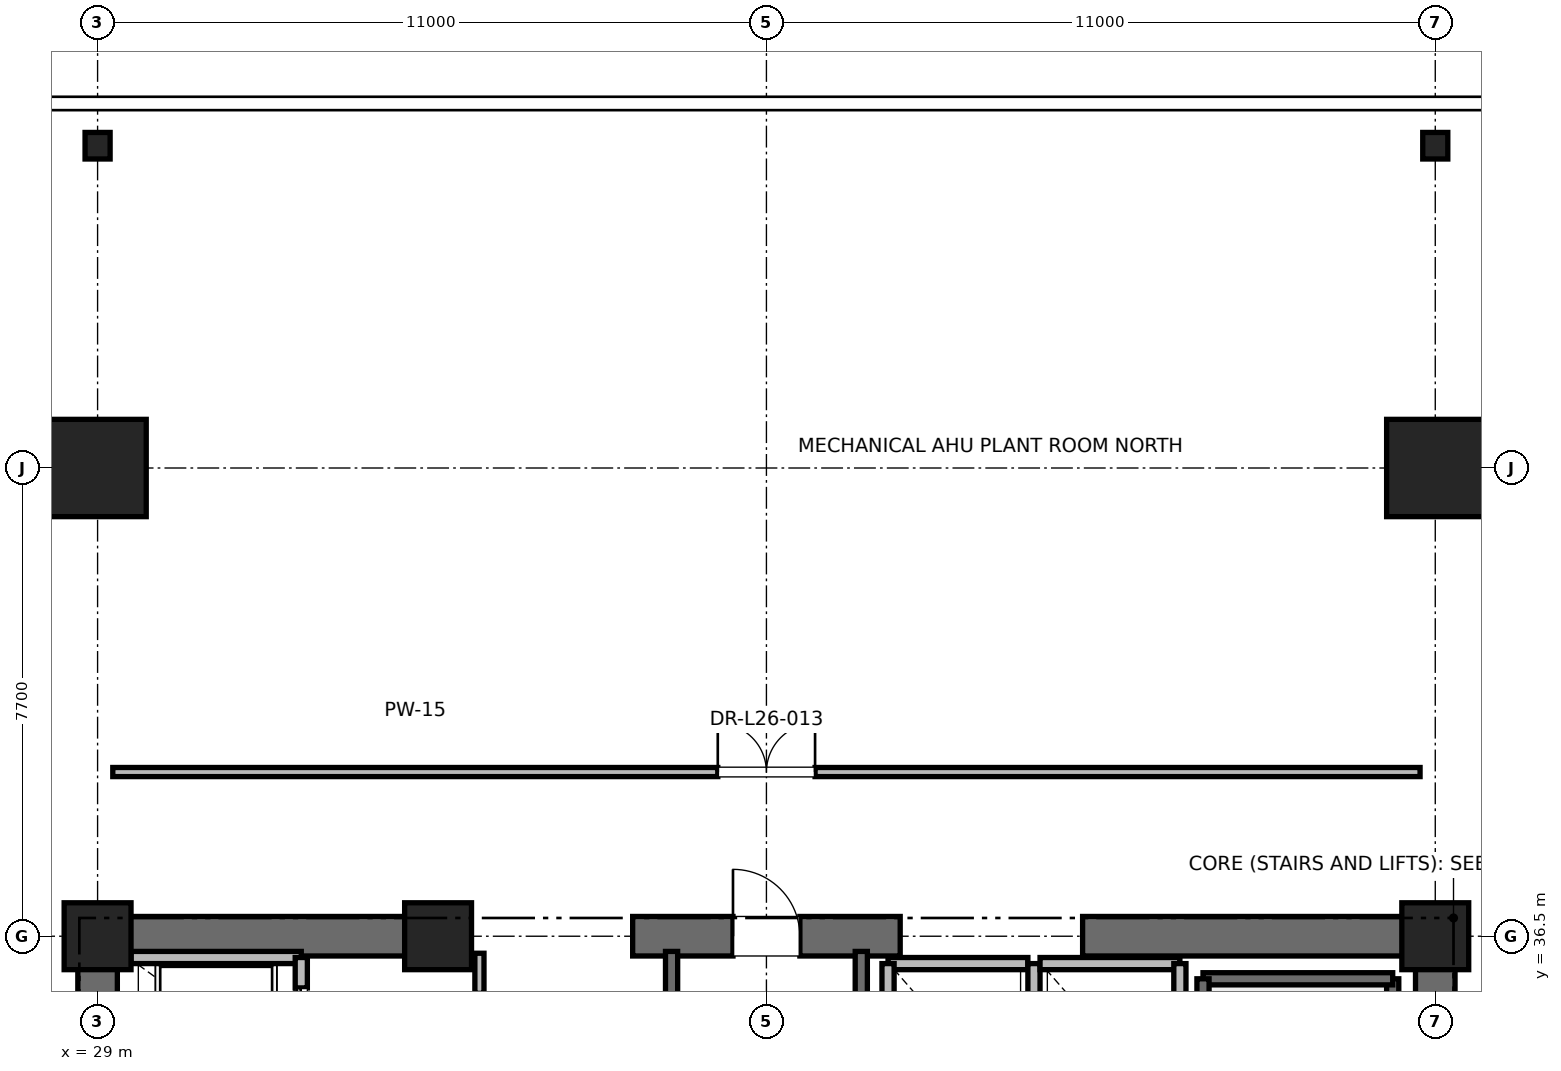
"""IFC4 building model, lengths in metres.
Left out: names, types, materials, properties, quantities, classifications, styles, units other than length and angle.
Written with IfcOpenShell. Run it as: python <this file> out.ifc"""

import sys

from ifc_helpers import new_model, si_unit, direction, frame, frame_2d, origin, origin_2d, place, context, subcontext, project, spatial, rectangle, i_section, extrude, element, fill, save


model = new_model("IFC4")
c1 = context("Model", 3, precision=1e-05, world=origin(), true_north=direction((0.0, 1.0)))
c2 = subcontext(c1, "Body", "Model", "MODEL_VIEW")
j1 = project(units=[si_unit("LENGTHUNIT", "METRE"), si_unit("PLANEANGLEUNIT", "RADIAN")], contexts=[c1])
p1 = place(None, origin())
s1 = spatial("IfcSite", under=j1, at=p1, CompositionType="ELEMENT")
p2 = place(p1, origin())
s2 = spatial("IfcBuilding", under=s1, at=p2, CompositionType="ELEMENT")
p3 = place(p2, frame((0.0, 0.0, 113.0)))
s3 = spatial("IfcBuildingStorey", under=s2, at=p3, CompositionType="ELEMENT", Elevation=113.0)
for number, where, z_axis, x_axis in (
    (1, (29.0, 44.2, 0.0), (0.0, 0.0, 1.0), (1.0, 0.0, 0.0)),
    (2, (51.0, 44.2, 0.0), (0.0, 0.0, 1.0), (1.0, 0.0, 0.0)),
):
    element("IfcColumn", number, at=place(p3, frame(where, z_axis=z_axis, x_axis=x_axis)), inside=s3, PredefinedType="COLUMN", context=c2, shape_type="SweptSolid", body=[
        extrude(rectangle(XDim=1.6, YDim=1.6, at=origin_2d()), origin(), (0.0, 0.0, 1.0), 5.4),
    ])
for number, where, z_axis, x_axis in (
    (3, (29.0, 49.5, 0.0), (0.0, 0.0, 1.0), (1.0, 0.0, 0.0)),
    (4, (51.0, 49.5, 0.0), (0.0, 0.0, 1.0), (1.0, 0.0, 0.0)),
):
    element("IfcColumn", number, at=place(p3, frame(where, z_axis=z_axis, x_axis=x_axis)), inside=s3, PredefinedType="COLUMN", context=c2, shape_type="SweptSolid", body=[
        extrude(i_section(OverallWidth=0.412, OverallDepth=0.437, WebThickness=0.036, FlangeThickness=0.058, FilletRadius=0.015, at=origin_2d()), origin(), (0.0, 0.0, 1.0), 5.4),
    ])
for number, where, z_axis, x_axis in (
    (5, (29.0, 36.5, 0.0), (0.0, 0.0, 1.0), (1.0, 0.0, 0.0)),
    (6, (51.0, 36.5, 0.0), (0.0, 0.0, 1.0), (1.0, 0.0, 0.0)),
    (7, (34.6, 36.5, 0.0), (0.0, 0.0, 1.0), (1.0, 0.0, 0.0)),
):
    element("IfcColumn", number, at=place(p3, frame(where, z_axis=z_axis, x_axis=x_axis)), inside=s3, PredefinedType="PILASTER", context=c2, shape_type="SweptSolid", body=[
        extrude(rectangle(XDim=1.1, YDim=1.1, at=origin_2d()), origin(), (0.0, 0.0, 1.0), 5.4),
    ])
p4 = place(p3, frame((29.0, 36.5, 0.0), z_axis=(0.0, 0.0, 1.0), x_axis=(1.0, 0.0, 0.0)))
e8 = element("IfcWall", 8, at=p4, inside=s3, PredefinedType="SHEAR", context=c2, shape_type="SweptSolid", body=[
    extrude(rectangle(XDim=5.8, YDim=0.65, at=frame_2d((2.9, 0.0))), origin(), (0.0, 0.0, 1.0), 5.1),
])
p5 = place(p3, frame((37.8, 36.5, 0.0), z_axis=(0.0, 0.0, 1.0), x_axis=(1.0, 0.0, 0.0)))
e9 = element("IfcWall", 9, at=p5, inside=s3, PredefinedType="SHEAR", context=c2, shape_type="SweptSolid", body=[
    extrude(rectangle(XDim=4.4, YDim=0.65, at=frame_2d((2.2, 0.0))), origin(), (0.0, 0.0, 1.0), 5.1),
])
p6 = place(p5, frame((1.65, 0.0, 0.0)))
e10 = element("IfcOpeningElement", 10, at=p6, cuts=e9, PredefinedType="OPENING", context=c2, shape_type="SweptSolid", body=[
    extrude(rectangle(XDim=1.1, YDim=2.15, at=frame_2d((0.55, 1.075))), frame((0.0, 0.325, 0.0), z_axis=(0.0, -1.0, 0.0), x_axis=(1.0, 0.0, 0.0)), (0.0, 0.0, 1.0), 0.65),
])
for number, where, z_axis, x_axis in (
    (11, (45.2, 36.5, 0.0), (0.0, 0.0, 1.0), (1.0, 0.0, 0.0)),
    (12, (29.0, 30.7, 0.0), (0.0, 0.0, 1.0), (0.0, 1.0, 0.0)),
):
    element("IfcWall", number, at=place(p3, frame(where, z_axis=z_axis, x_axis=x_axis)), inside=s3, PredefinedType="SHEAR", context=c2, shape_type="SweptSolid", body=[
        extrude(rectangle(XDim=5.8, YDim=0.65, at=frame_2d((2.9, 0.0))), origin(), (0.0, 0.0, 1.0), 5.1),
    ])
p7 = place(p3, frame((51.0, 27.7, 0.0), z_axis=(0.0, 0.0, 1.0), x_axis=(0.0, 1.0, 0.0)))
e13 = element("IfcWall", 13, at=p7, inside=s3, PredefinedType="SHEAR", context=c2, shape_type="SweptSolid", body=[
    extrude(rectangle(XDim=8.8, YDim=0.65, at=frame_2d((4.4, 0.0))), origin(), (0.0, 0.0, 1.0), 5.1),
])
p8 = place(p3, frame((50.3, 27.65, 0.0), z_axis=(0.0, 0.0, 1.0), x_axis=(0.0, 1.0, 0.0)))
e14 = element("IfcWall", 14, at=p8, inside=s3, PredefinedType="SOLIDWALL", context=c2, shape_type="SweptSolid", body=[
    extrude(rectangle(XDim=8.15, YDim=0.2, at=frame_2d((4.075, 0.0))), origin(), (0.0, 0.0, 1.0), 5.1),
])
p9 = place(p3, frame((47.18, 35.8, 0.0), z_axis=(0.0, 0.0, 1.0), x_axis=(1.0, 0.0, 0.0)))
e15 = element("IfcWall", 15, at=p9, inside=s3, PredefinedType="SOLIDWALL", context=c2, shape_type="SweptSolid", body=[
    extrude(rectangle(XDim=3.12, YDim=0.2, at=frame_2d((1.56, 0.0))), origin(), (0.0, 0.0, 1.0), 5.1),
])
p10 = place(p3, frame((47.18, 27.62, 0.0), z_axis=(0.0, 0.0, 1.0), x_axis=(0.0, 1.0, 0.0)))
e16 = element("IfcWall", 16, at=p10, inside=s3, PredefinedType="SOLIDWALL", context=c2, shape_type="SweptSolid", body=[
    extrude(rectangle(XDim=8.18, YDim=0.2, at=frame_2d((4.09, 0.0))), origin(), (0.0, 0.0, 1.0), 5.1),
])
p11 = place(p3, frame((38.44, 27.38, 0.0), z_axis=(0.0, 0.0, 1.0), x_axis=(0.0, 1.0, 0.0)))
e17 = element("IfcWall", 17, at=p11, inside=s3, PredefinedType="SOLIDWALL", context=c2, shape_type="SweptSolid", body=[
    extrude(rectangle(XDim=8.87, YDim=0.2, at=frame_2d((4.435, 0.0))), origin(), (0.0, 0.0, 1.0), 5.1),
])
p12 = place(p3, frame((41.56, 27.68, 0.0), z_axis=(0.0, 0.0, 1.0), x_axis=(0.0, 1.0, 0.0)))
e18 = element("IfcWall", 18, at=p12, inside=s3, PredefinedType="SOLIDWALL", context=c2, shape_type="SweptSolid", body=[
    extrude(rectangle(XDim=8.57, YDim=0.2, at=frame_2d((4.285, 0.0))), origin(), (0.0, 0.0, 1.0), 5.1),
])
p13 = place(p3, frame((32.35, 36.15, 0.0), z_axis=(0.0, 0.0, 1.0), x_axis=(-1.0, 0.0, 0.0)))
e19 = element("IfcWall", 19, at=p13, inside=s3, PredefinedType="SOLIDWALL", context=c2, shape_type="SweptSolid", body=[
    extrude(rectangle(XDim=2.8, YDim=0.2, at=frame_2d((1.4, 0.0))), origin(), (0.0, 0.0, 1.0), 4.153),
])
p14 = place(p3, frame((32.35, 34.05, 0.0), z_axis=(0.0, 0.0, 1.0), x_axis=(0.0, 1.0, 0.0)))
e20 = element("IfcWall", 20, at=p14, inside=s3, PredefinedType="SOLIDWALL", context=c2, shape_type="SweptSolid", body=[
    extrude(rectangle(XDim=2.1, YDim=0.2, at=frame_2d((1.05, 0.0))), origin(), (0.0, 0.0, 1.0), 5.1),
])
p15 = place(p14, frame((0.5, 0.0, 0.0)))
e21 = element("IfcOpeningElement", 21, at=p15, cuts=e20, PredefinedType="OPENING", context=c2, shape_type="SweptSolid", body=[
    extrude(rectangle(XDim=1.1, YDim=2.2, at=frame_2d((0.55, 1.1))), frame((0.0, 0.1, 0.0), z_axis=(0.0, -1.0, 0.0), x_axis=(1.0, 0.0, 0.0)), (0.0, 0.0, 1.0), 0.2),
])
p16 = place(p3, frame((44.3, 36.05, 0.0), z_axis=(0.0, 0.0, 1.0), x_axis=(-1.0, 0.0, 0.0)))
e22 = element("IfcWall", 22, at=p16, inside=s3, PredefinedType="SOLIDWALL", context=c2, shape_type="SweptSolid", body=[
    extrude(rectangle(XDim=2.3, YDim=0.2, at=frame_2d((1.15, 0.0))), origin(), (0.0, 0.0, 1.0), 3.88),
])
for number, where, z_axis, x_axis in (
    (23, (42.0, 36.05, 0.0), (0.0, 0.0, 1.0), (0.0, -1.0, 0.0)),
    (24, (44.4, 33.45, 0.0), (0.0, 0.0, 1.0), (0.0, 1.0, 0.0)),
):
    element("IfcWall", number, at=place(p3, frame(where, z_axis=z_axis, x_axis=x_axis)), inside=s3, PredefinedType="SOLIDWALL", context=c2, shape_type="SweptSolid", body=[
        extrude(rectangle(XDim=2.6, YDim=0.2, at=frame_2d((1.3, 0.0))), origin(), (0.0, 0.0, 1.0), 3.88),
    ])
p17 = place(p3, frame((46.8, 36.05, 0.0), z_axis=(0.0, 0.0, 1.0), x_axis=(-1.0, 0.0, 0.0)))
e25 = element("IfcWall", 25, at=p17, inside=s3, PredefinedType="SOLIDWALL", context=c2, shape_type="SweptSolid", body=[
    extrude(rectangle(XDim=2.3, YDim=0.2, at=frame_2d((1.15, 0.0))), origin(), (0.0, 0.0, 1.0), 3.88),
])
p18 = place(p3, frame((46.8, 33.45, 0.0), z_axis=(0.0, 0.0, 1.0), x_axis=(0.0, 1.0, 0.0)))
e26 = element("IfcWall", 26, at=p18, inside=s3, PredefinedType="SOLIDWALL", context=c2, shape_type="SweptSolid", body=[
    extrude(rectangle(XDim=2.6, YDim=0.2, at=frame_2d((1.3, 0.0))), origin(), (0.0, 0.0, 1.0), 5.1),
])
p19 = place(p3, frame((35.28, 33.95, 0.0), z_axis=(0.0, 0.0, 1.0), x_axis=(0.0, 1.0, 0.0)))
e27 = element("IfcWall", 27, at=p19, inside=s3, PredefinedType="PARTITIONING", context=c2, shape_type="SweptSolid", body=[
    extrude(rectangle(XDim=2.27, YDim=0.15, at=frame_2d((1.135, 0.0))), origin(), (0.0, 0.0, 1.0), 2.85),
])
p20 = place(p19, frame((0.66, 0.0, 0.0)))
e28 = element("IfcOpeningElement", 28, at=p20, cuts=e27, PredefinedType="OPENING", context=c2, shape_type="SweptSolid", body=[
    extrude(rectangle(XDim=0.95, YDim=2.15, at=frame_2d((0.475, 1.075))), frame((0.0, 0.075, 0.0), z_axis=(0.0, -1.0, 0.0), x_axis=(1.0, 0.0, 0.0)), (0.0, 0.0, 1.0), 0.15),
])
p21 = place(p3, frame((29.25, 39.2, 0.0), z_axis=(0.0, 0.0, 1.0), x_axis=(1.0, 0.0, 0.0)))
e29 = element("IfcWall", 29, at=p21, inside=s3, PredefinedType="PARTITIONING", context=c2, shape_type="SweptSolid", body=[
    extrude(rectangle(XDim=21.5, YDim=0.15, at=frame_2d((10.75, 0.0))), origin(), (0.0, 0.0, 1.0), 2.85),
])
p22 = place(p21, frame((9.95, 0.0, 0.0)))
e30 = element("IfcOpeningElement", 30, at=p22, cuts=e29, PredefinedType="OPENING", context=c2, shape_type="SweptSolid", body=[
    extrude(rectangle(XDim=1.6, YDim=2.25, at=frame_2d((0.8, 1.125))), frame((0.0, 0.075, 0.0), z_axis=(0.0, -1.0, 0.0), x_axis=(1.0, 0.0, 0.0)), (0.0, 0.0, 1.0), 0.15),
])
p23 = place(p6, origin())
e31 = element("IfcDoor", 31, at=p23, inside=s3, OperationType="SINGLE_SWING_LEFT", PredefinedType="DOOR", context=c2, shape_type="SweptSolid", body=[
    extrude(rectangle(XDim=1.1, YDim=2.15, at=frame_2d((0.55, 1.075))), frame((0.0, 0.025, 0.0), z_axis=(0.0, -1.0, 0.0), x_axis=(1.0, 0.0, 0.0)), (0.0, 0.0, 1.0), 0.05),
])
fill(e10, e31)
p24 = place(p15, origin())
e32 = element("IfcDoor", 32, at=p24, inside=s3, OperationType="SLIDING_TO_RIGHT", PredefinedType="DOOR", context=c2, shape_type="SweptSolid", body=[
    extrude(rectangle(XDim=1.1, YDim=2.2, at=frame_2d((0.55, 1.1))), frame((0.0, 0.025, 0.0), z_axis=(0.0, -1.0, 0.0), x_axis=(1.0, 0.0, 0.0)), (0.0, 0.0, 1.0), 0.05),
])
fill(e21, e32)
p25 = place(p22, origin())
e33 = element("IfcDoor", 33, at=p25, inside=s3, OperationType="DOUBLE_DOOR_SINGLE_SWING", PredefinedType="DOOR", context=c2, shape_type="SweptSolid", body=[
    extrude(rectangle(XDim=1.6, YDim=2.25, at=frame_2d((0.8, 1.125))), frame((0.0, 0.025, 0.0), z_axis=(0.0, -1.0, 0.0), x_axis=(1.0, 0.0, 0.0)), (0.0, 0.0, 1.0), 0.05),
])
fill(e30, e33)
save(model, sys.argv[1])
